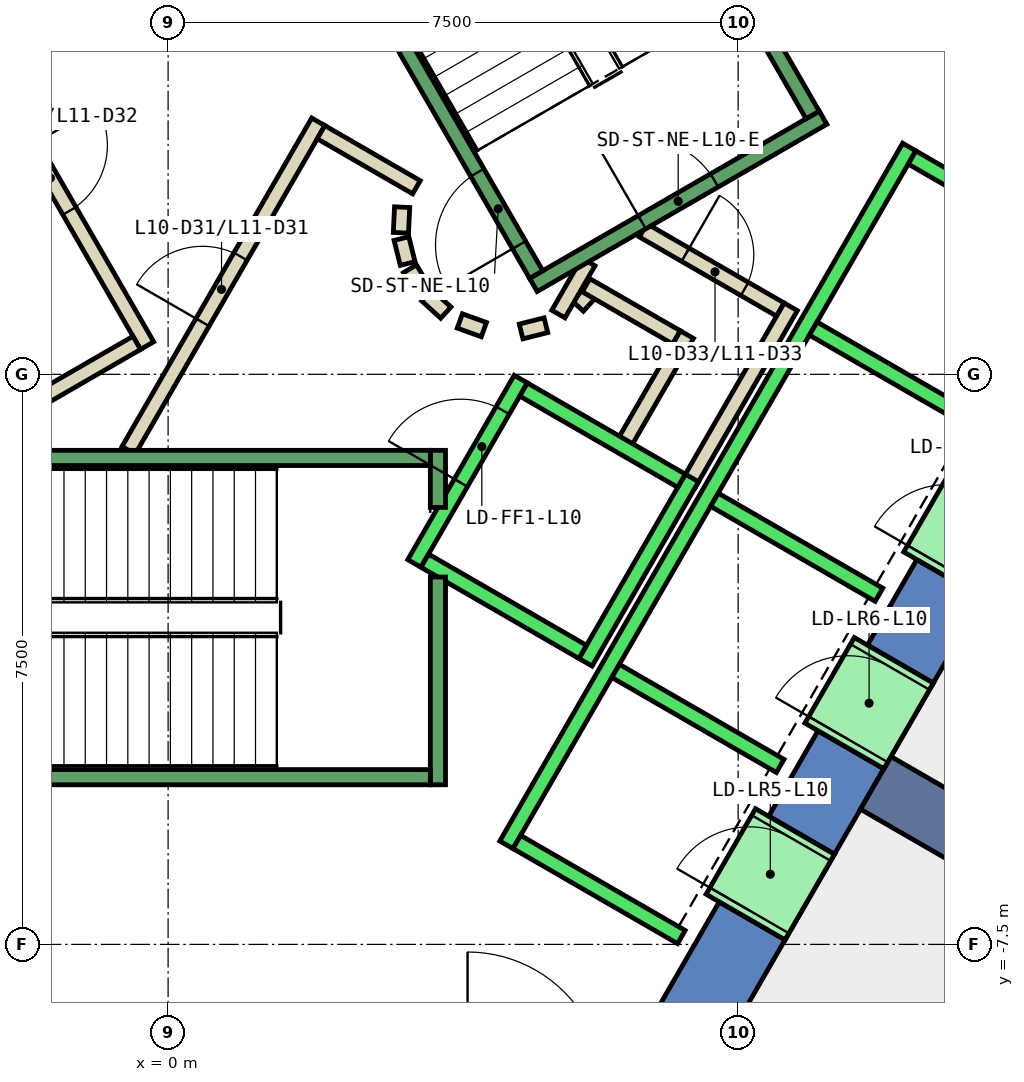
"""IFC4 building model, lengths in metres.
Left out: names, types, materials, properties, quantities, classifications, styles, units other than length and angle.
Written with IfcOpenShell. Run it as: python <this file> out.ifc"""

import sys

from ifc_helpers import new_model, si_unit, direction, frame, frame_2d, origin, place, context, subcontext, project, spatial, polyline, rectangle, outline, extrude, element, fill, save


model = new_model("IFC4")
c1 = context("Model", 3, precision=1e-05, world=origin(), true_north=direction((0.0, 1.0)))
c2 = subcontext(c1, "Body", "Model", "MODEL_VIEW")
j1 = project(units=[si_unit("LENGTHUNIT", "METRE"), si_unit("PLANEANGLEUNIT", "RADIAN")], contexts=[c1])
p1 = place(None, origin())
s1 = spatial("IfcSite", under=j1, at=p1, CompositionType="ELEMENT")
p2 = place(p1, origin())
s2 = spatial("IfcBuilding", under=s1, at=p2, CompositionType="ELEMENT")
p3 = place(p2, frame((0.0, 0.0, 51.8)))
s3 = spatial("IfcBuildingStorey", under=s2, at=p3, CompositionType="ELEMENT", Elevation=51.8)
p4 = place(p3, frame((0.0, 0.0, -0.4)))
e1 = element("IfcWall", 1, at=p4, inside=s3, PredefinedType="SHEAR", context=c2, shape_type="SweptSolid", body=[
    extrude(outline(polyline([(8.517, 11.748), (7.651, 11.248), (12.702, 2.5), (13.856, 2.5), (8.517, 11.748)])), origin(), (0.0, 0.0, 1.0), 4.2),
])
p5 = place(p3, frame((0.0, 0.0, -0.4)))
e2 = element("IfcWall", 2, at=p5, inside=s3, PredefinedType="SHEAR", context=c2, shape_type="SweptSolid", body=[
    extrude(outline(polyline([(8.117, -7.44), (7.252, -6.94), (6.351, -8.5), (6.928, -9.5), (8.117, -7.44)])), origin(), (0.0, 0.0, 1.0), 4.2),
])
p6 = place(p3, frame((0.0, 0.0, -0.4)))
e3 = element("IfcWall", 3, at=p6, inside=s3, PredefinedType="SHEAR", context=c2, shape_type="SweptSolid", body=[
    extrude(outline(polyline([(9.417, -5.189), (8.551, -4.689), (7.902, -5.814), (8.767, -6.314), (9.417, -5.189)])), origin(), (0.0, 0.0, 1.0), 4.2),
])
p7 = place(p3, frame((0.0, 0.0, -0.4)))
e4 = element("IfcWall", 4, at=p7, inside=s3, PredefinedType="SHEAR", context=c2, shape_type="SweptSolid", body=[
    extrude(outline(polyline([(10.717, -2.937), (9.851, -2.437), (9.201, -3.563), (10.067, -4.063), (10.717, -2.937)])), origin(), (0.0, 0.0, 1.0), 4.2),
])
p8 = place(p3, frame((0.0, 0.0, 3.6)))
e5 = element("IfcWall", 5, at=p8, inside=s3, PredefinedType="SHEAR", context=c2, shape_type="SweptSolid", body=[
    extrude(outline(polyline([(8.767, -6.314), (7.902, -5.814), (7.252, -6.94), (8.117, -7.44), (8.767, -6.314)])), origin(), (0.0, 0.0, 1.0), 0.2),
])
p9 = place(p3, frame((0.0, 0.0, 3.6)))
e6 = element("IfcWall", 6, at=p9, inside=s3, PredefinedType="SHEAR", context=c2, shape_type="SweptSolid", body=[
    extrude(outline(polyline([(10.067, -4.063), (9.201, -3.563), (8.551, -4.689), (9.417, -5.189), (10.067, -4.063)])), origin(), (0.0, 0.0, 1.0), 0.2),
])
p10 = place(p3, frame((0.0, 0.0, 3.6)))
e7 = element("IfcWall", 7, at=p10, inside=s3, PredefinedType="SHEAR", context=c2, shape_type="SweptSolid", body=[
    extrude(outline(polyline([(11.367, -1.811), (10.501, -1.311), (9.851, -2.437), (10.717, -2.937), (11.367, -1.811)])), origin(), (0.0, 0.0, 1.0), 0.2),
])
p11 = place(p3, frame((9.31, -5.375, -0.4), z_axis=(0.0, 0.0, 1.0), x_axis=(0.866017533419, -0.500013631625, 0.0)))
e8 = element("IfcWall", 8, at=p11, inside=s3, PredefinedType="SHEAR", context=c2, shape_type="SweptSolid", body=[
    extrude(rectangle(XDim=9.0, YDim=0.8, at=frame_2d((4.5, 0.0))), origin(), (0.0, 0.0, 1.0), 4.2),
])
p12 = place(p3, frame((5.39, 0.898, 0.0), z_axis=(0.0, 0.0, 1.0), x_axis=(0.673828488714, 0.738887791073, 0.0)))
e9 = element("IfcWall", 9, at=p12, inside=s3, PredefinedType="PARTITIONING", context=c2, shape_type="SweptSolid", body=[
    extrude(rectangle(XDim=0.263, YDim=0.2, at=frame_2d((0.131, 0.0))), origin(), (0.0, 0.0, 1.0), 3.8),
])
p13 = place(p3, frame((5.499, 1.172, 0.0), z_axis=(0.0, 0.0, 1.0), x_axis=(0.866333505267, -0.499465972466, 0.0)))
e10 = element("IfcWall", 10, at=p13, inside=s3, PredefinedType="PARTITIONING", context=c2, shape_type="SweptSolid", body=[
    extrude(rectangle(XDim=1.374, YDim=0.2, at=frame_2d((0.687, 0.0))), origin(), (0.0, 0.0, 1.0), 3.8),
])
p14 = place(p3, frame((6.826, 0.522, 0.0), z_axis=(0.0, 0.0, 1.0), x_axis=(-0.500016722714, -0.866015748706, 0.0)))
e11 = element("IfcWall", 11, at=p14, inside=s3, PredefinedType="PARTITIONING", context=c2, shape_type="SweptSolid", body=[
    extrude(rectangle(XDim=1.7, YDim=0.2, at=frame_2d((0.85, 0.0))), origin(), (0.0, 0.0, 1.0), 3.8),
])
p15 = place(p3, frame((6.25, 1.894, 0.0), z_axis=(0.0, 0.0, 1.0), x_axis=(0.866043184279, -0.499969202016, 0.0)))
e12 = element("IfcWall", 12, at=p15, inside=s3, PredefinedType="PARTITIONING", context=c2, shape_type="SweptSolid", body=[
    extrude(rectangle(XDim=2.084, YDim=0.2, at=frame_2d((1.042, 0.0))), origin(), (0.0, 0.0, 1.0), 3.8),
])
p16 = place(p15, frame((0.642, 0.0, 0.0)))
e13 = element("IfcOpeningElement", 13, at=p16, cuts=e12, PredefinedType="OPENING", context=c2, shape_type="SweptSolid", body=[
    extrude(rectangle(XDim=0.9, YDim=2.1, at=frame_2d((0.45, 1.05))), frame((0.0, 0.11, 0.0), z_axis=(0.0, -1.0, 0.0), x_axis=(1.0, 0.0, 0.0)), (0.0, 0.0, 1.0), 0.22),
])
p17 = place(p3, frame((8.192, 0.888, 0.0), z_axis=(0.0, 0.0, 1.0), x_axis=(-0.499940625693, -0.866059680843, 0.0)))
e14 = element("IfcWall", 14, at=p17, inside=s3, PredefinedType="PARTITIONING", context=c2, shape_type="SweptSolid", body=[
    extrude(rectangle(XDim=2.68, YDim=0.2, at=frame_2d((1.34, 0.0))), origin(), (0.0, 0.0, 1.0), 3.8),
])
p18 = place(p3, frame((5.135, 0.793, 0.0), z_axis=(0.0, 0.0, 1.0), x_axis=(0.499526442893, 0.866298639529, 0.0)))
e15 = element("IfcWall", 15, at=p18, inside=s3, PredefinedType="PARTITIONING", context=c2, shape_type="SweptSolid", body=[
    extrude(rectangle(XDim=0.791, YDim=0.2, at=frame_2d((0.396, 0.0))), origin(), (0.0, 0.0, 1.0), 3.8),
])
p19 = place(p3, frame((-0.52, -1.0, 0.0), z_axis=(0.0, 0.0, 1.0), x_axis=(0.50011622646, 0.865958290007, 0.0)))
e16 = element("IfcWall", 16, at=p19, inside=s3, PredefinedType="PARTITIONING", context=c2, shape_type="SweptSolid", body=[
    extrude(rectangle(XDim=4.991, YDim=0.2, at=frame_2d((2.496, 0.0))), origin(), (0.0, 0.0, 1.0), 3.8),
])
p20 = place(p19, frame((1.945, 0.0, 0.0)))
e17 = element("IfcOpeningElement", 17, at=p20, cuts=e16, PredefinedType="OPENING", context=c2, shape_type="SweptSolid", body=[
    extrude(rectangle(XDim=1.0, YDim=2.1, at=frame_2d((0.5, 1.05))), frame((0.0, 0.11, 0.0), z_axis=(0.0, -1.0, 0.0), x_axis=(1.0, 0.0, 0.0)), (0.0, 0.0, 1.0), 0.22),
])
p21 = place(p3, frame((2.012, 3.186, 0.0), z_axis=(0.0, 0.0, 1.0), x_axis=(0.865891012941, -0.500232699559, 0.0)))
e18 = element("IfcWall", 18, at=p21, inside=s3, PredefinedType="PARTITIONING", context=c2, shape_type="SweptSolid", body=[
    extrude(rectangle(XDim=1.449, YDim=0.2, at=frame_2d((0.725, 0.0))), origin(), (0.0, 0.0, 1.0), 3.8),
])
p22 = place(p3, frame((3.079, 2.199, 0.0), z_axis=(0.0, 0.0, 1.0), x_axis=(-0.047771483479, -0.998858290933, 0.0)))
e19 = element("IfcWall", 19, at=p22, inside=s3, PredefinedType="PARTITIONING", context=c2, shape_type="SweptSolid", body=[
    extrude(rectangle(XDim=0.337, YDim=0.2, at=frame_2d((0.169, 0.0))), origin(), (0.0, 0.0, 1.0), 3.8),
])
p23 = place(p3, frame((3.07, 1.786, 0.0), z_axis=(0.0, 0.0, 1.0), x_axis=(0.242705583207, -0.970099994784, 0.0)))
e20 = element("IfcWall", 20, at=p23, inside=s3, PredefinedType="PARTITIONING", context=c2, shape_type="SweptSolid", body=[
    extrude(rectangle(XDim=0.338, YDim=0.2, at=frame_2d((0.169, 0.0))), origin(), (0.0, 0.0, 1.0), 3.8),
])
for number, where, z_axis, x_axis in (
    (21, (3.182, 1.388, 0.0), (0.0, 0.0, 1.0), (0.512, -0.859, 0.0)),
    (22, (3.404, 1.039, 0.0), (0.0, 0.0, 1.0), (0.74, -0.672, 0.0)),
):
    element("IfcWall", number, at=place(p3, frame(where, z_axis=z_axis, x_axis=x_axis)), inside=s3, PredefinedType="PARTITIONING", context=c2, shape_type="SweptSolid", body=[
        extrude(rectangle(XDim=0.338, YDim=0.2, at=frame_2d((0.169, 0.0))), origin(), (0.0, 0.0, 1.0), 3.8),
    ])
p24 = place(p3, frame((3.838, 0.702, 0.0), z_axis=(0.0, 0.0, 1.0), x_axis=(0.941035081519, -0.338308993895, 0.0)))
e23 = element("IfcWall", 23, at=p24, inside=s3, PredefinedType="PARTITIONING", context=c2, shape_type="SweptSolid", body=[
    extrude(rectangle(XDim=0.337, YDim=0.2, at=frame_2d((0.168, 0.0))), origin(), (0.0, 0.0, 1.0), 3.8),
])
p25 = place(p3, frame((4.644, 0.564, 0.0), z_axis=(0.0, 0.0, 1.0), x_axis=(0.969929076366, 0.243387729394, 0.0)))
e24 = element("IfcWall", 24, at=p25, inside=s3, PredefinedType="PARTITIONING", context=c2, shape_type="SweptSolid", body=[
    extrude(rectangle(XDim=0.337, YDim=0.2, at=frame_2d((0.168, 0.0))), origin(), (0.0, 0.0, 1.0), 3.8),
])
p26 = place(p3, frame((-2.771, 4.7, 0.0), z_axis=(0.0, 0.0, 1.0), x_axis=(0.499969479948, -0.866043023828, 0.0)))
e25 = element("IfcWall", 25, at=p26, inside=s3, PredefinedType="PARTITIONING", context=c2, shape_type="SweptSolid", body=[
    extrude(rectangle(XDim=4.99, YDim=0.2, at=frame_2d((2.495, 0.0))), origin(), (0.0, 0.0, 1.0), 3.8),
])
p27 = place(p26, frame((1.945, 0.0, 0.0)))
e26 = element("IfcOpeningElement", 26, at=p27, cuts=e25, PredefinedType="OPENING", context=c2, shape_type="SweptSolid", body=[
    extrude(rectangle(XDim=1.0, YDim=2.1, at=frame_2d((0.5, 1.05))), frame((0.0, 0.11, 0.0), z_axis=(0.0, -1.0, 0.0), x_axis=(1.0, 0.0, 0.0)), (0.0, 0.0, 1.0), 0.22),
])
p28 = place(p3, frame((-0.412, 0.414, 0.0), z_axis=(0.0, 0.0, 1.0), x_axis=(-0.866017369001, -0.500013916395, 0.0)))
e27 = element("IfcWall", 27, at=p28, inside=s3, PredefinedType="PARTITIONING", context=c2, shape_type="SweptSolid", body=[
    extrude(rectangle(XDim=1.45, YDim=0.2, at=frame_2d((0.725, 0.0))), origin(), (0.0, 0.0, 1.0), 3.8),
])
p29 = place(p3, frame((12.401, -7.621, 0.0), z_axis=(0.0, 0.0, 1.0), x_axis=(-0.499983724212, -0.866034800411, 0.0)))
e28 = element("IfcWall", 28, at=p29, inside=s3, PredefinedType="PARTITIONING", context=c2, shape_type="SweptSolid", body=[
    extrude(rectangle(XDim=9.302, YDim=0.2, at=frame_2d((4.651, 0.0))), origin(), (0.0, 0.0, 1.0), 3.8),
])
p30 = place(p3, frame((3.24, -2.488, 0.0), z_axis=(0.0, 0.0, 1.0), x_axis=(0.49994636267, 0.866056369097, 0.0)))
e29 = element("IfcWall", 29, at=p30, inside=s3, PredefinedType="STANDARD", context=c2, shape_type="SweptSolid", body=[
    extrude(rectangle(XDim=2.8, YDim=0.2, at=frame_2d((1.4, 0.0))), origin(), (0.0, 0.0, 1.0), 3.8),
])
p31 = place(p30, frame((1.225, 0.0, 0.0)))
e30 = element("IfcOpeningElement", 30, at=p31, cuts=e29, PredefinedType="OPENING", context=c2, shape_type="SweptSolid", body=[
    extrude(rectangle(XDim=1.1, YDim=2.1, at=frame_2d((0.55, 1.05))), frame((0.0, 0.11, 0.0), z_axis=(0.0, -1.0, 0.0), x_axis=(1.0, 0.0, 0.0)), (0.0, 0.0, 1.0), 0.22),
])
p32 = place(p3, frame((5.492, -3.788, 0.0), z_axis=(0.0, 0.0, 1.0), x_axis=(0.500011755427, 0.866018616679, 0.0)))
e31 = element("IfcWall", 31, at=p32, inside=s3, PredefinedType="STANDARD", context=c2, shape_type="SweptSolid", body=[
    extrude(rectangle(XDim=2.8, YDim=0.2, at=frame_2d((1.4, 0.0))), origin(), (0.0, 0.0, 1.0), 3.8),
])
p33 = place(p3, frame((3.377, -2.452, 0.0), z_axis=(0.0, 0.0, 1.0), x_axis=(0.865955154139, -0.50012165622, 0.0)))
e32 = element("IfcWall", 32, at=p33, inside=s3, PredefinedType="STANDARD", context=c2, shape_type="SweptSolid", body=[
    extrude(rectangle(XDim=2.4, YDim=0.2, at=frame_2d((1.2, 0.0))), origin(), (0.0, 0.0, 1.0), 3.8),
])
p34 = place(p3, frame((4.677, -0.2, 0.0), z_axis=(0.0, 0.0, 1.0), x_axis=(0.865973769406, -0.500089422704, 0.0)))
e33 = element("IfcWall", 33, at=p34, inside=s3, PredefinedType="STANDARD", context=c2, shape_type="SweptSolid", body=[
    extrude(rectangle(XDim=2.399, YDim=0.2, at=frame_2d((1.2, 0.0))), origin(), (0.0, 0.0, 1.0), 3.8),
])
p35 = place(p3, frame((4.451, -6.19, 0.0), z_axis=(0.0, 0.0, 1.0), x_axis=(0.50000090737, 0.866024879913, 0.0)))
e34 = element("IfcWall", 34, at=p35, inside=s3, PredefinedType="STANDARD", context=c2, shape_type="SweptSolid", body=[
    extrude(rectangle(XDim=10.6, YDim=0.2, at=frame_2d((5.3, 0.0))), origin(), (0.0, 0.0, 1.0), 3.8),
])
for number, where, z_axis, x_axis in (
    (35, (4.588, -6.153, 0.0), (0.0, 0.0, 1.0), (0.866, -0.5, 0.0)),
    (36, (5.888, -3.902, 0.0), (0.0, 0.0, 1.0), (0.866, -0.5, 0.0)),
    (37, (7.188, -1.65, 0.0), (0.0, 0.0, 1.0), (0.866, -0.5, 0.0)),
    (38, (8.488, 0.602, 0.0), (0.0, 0.0, 1.0), (0.866, -0.5, 0.0)),
):
    element("IfcWall", number, at=place(p3, frame(where, z_axis=z_axis, x_axis=x_axis)), inside=s3, PredefinedType="STANDARD", context=c2, shape_type="SweptSolid", body=[
        extrude(rectangle(XDim=2.5, YDim=0.2, at=frame_2d((1.25, 0.0))), origin(), (0.0, 0.0, 1.0), 3.8),
    ])
p36 = place(p3, frame((9.788, 2.853, 0.0), z_axis=(0.0, 0.0, 1.0), x_axis=(0.865998541277, -0.500046524342, 0.0)))
e39 = element("IfcWall", 39, at=p36, inside=s3, PredefinedType="STANDARD", context=c2, shape_type="SweptSolid", body=[
    extrude(rectangle(XDim=2.5, YDim=0.2, at=frame_2d((1.25, 0.0))), origin(), (0.0, 0.0, 1.0), 3.8),
])
p37 = place(p3, frame((7.598, -7.14, 0.0), z_axis=(0.0, 0.0, 1.0), x_axis=(0.500362116554, 0.865816234728, 0.0)))
e40 = element("IfcWall", 40, at=p37, inside=s3, PredefinedType="STANDARD", context=c2, shape_type="SweptSolid", body=[
    extrude(rectangle(XDim=1.299, YDim=1.2, at=frame_2d((0.65, 0.0))), origin(), (0.0, 0.0, 1.0), 2.4),
])
p38 = place(p37, frame((0.1, 0.0, 0.0)))
e41 = element("IfcOpeningElement", 41, at=p38, cuts=e40, PredefinedType="OPENING", context=c2, shape_type="SweptSolid", body=[
    extrude(rectangle(XDim=1.1, YDim=2.3, at=frame_2d((0.55, 1.15))), frame((0.0, 0.61, 0.0), z_axis=(0.0, -1.0, 0.0), x_axis=(1.0, 0.0, 0.0)), (0.0, 0.0, 1.0), 1.22),
])
p39 = place(p3, frame((8.898, -4.889, 0.0), z_axis=(0.0, 0.0, 1.0), x_axis=(0.500036693733, 0.866004217611, 0.0)))
e42 = element("IfcWall", 42, at=p39, inside=s3, PredefinedType="STANDARD", context=c2, shape_type="SweptSolid", body=[
    extrude(rectangle(XDim=1.3, YDim=1.2, at=frame_2d((0.65, 0.0))), origin(), (0.0, 0.0, 1.0), 2.4),
])
p40 = place(p39, frame((0.1, 0.0, 0.0)))
e43 = element("IfcOpeningElement", 43, at=p40, cuts=e42, PredefinedType="OPENING", context=c2, shape_type="SweptSolid", body=[
    extrude(rectangle(XDim=1.1, YDim=2.3, at=frame_2d((0.55, 1.15))), frame((0.0, 0.61, 0.0), z_axis=(0.0, -1.0, 0.0), x_axis=(1.0, 0.0, 0.0)), (0.0, 0.0, 1.0), 1.22),
])
p41 = place(p3, frame((10.198, -2.637, 0.0), z_axis=(0.0, 0.0, 1.0), x_axis=(0.49989585183, 0.866085525409, 0.0)))
e44 = element("IfcWall", 44, at=p41, inside=s3, PredefinedType="STANDARD", context=c2, shape_type="SweptSolid", body=[
    extrude(rectangle(XDim=1.3, YDim=1.2, at=frame_2d((0.65, 0.0))), origin(), (0.0, 0.0, 1.0), 2.4),
])
p42 = place(p41, frame((0.1, 0.0, 0.0)))
e45 = element("IfcOpeningElement", 45, at=p42, cuts=e44, PredefinedType="OPENING", context=c2, shape_type="SweptSolid", body=[
    extrude(rectangle(XDim=1.1, YDim=2.3, at=frame_2d((0.55, 1.15))), frame((0.0, 0.61, 0.0), z_axis=(0.0, -1.0, 0.0), x_axis=(1.0, 0.0, 0.0)), (0.0, 0.0, 1.0), 1.22),
])
p43 = place(p3, frame((3.55, -2.667, 0.0), z_axis=(0.0, 0.0, 1.0), x_axis=(0.0, -1.0, 0.0)))
e46 = element("IfcWall", 46, at=p43, inside=s3, PredefinedType="STANDARD", context=c2, shape_type="SweptSolid", body=[
    extrude(rectangle(XDim=2.733, YDim=0.2, at=frame_2d((1.366, 0.0))), origin(), (0.0, 0.0, 1.0), 3.8),
])
p44 = place(p3, frame((3.55, -1.0, 0.0), z_axis=(0.0, 0.0, 1.0), x_axis=(0.0, -1.0, 0.0)))
e47 = element("IfcWall", 47, at=p44, inside=s3, PredefinedType="STANDARD", context=c2, shape_type="SweptSolid", body=[
    extrude(rectangle(XDim=0.751, YDim=0.2, at=frame_2d((0.375, 0.0))), origin(), (0.0, 0.0, 1.0), 3.8),
])
p45 = place(p3, frame((-3.45, -1.1, 0.0), z_axis=(0.0, 0.0, 1.0), x_axis=(1.0, 0.0, 0.0)))
e48 = element("IfcWall", 48, at=p45, inside=s3, PredefinedType="STANDARD", context=c2, shape_type="SweptSolid", body=[
    extrude(rectangle(XDim=6.9, YDim=0.2, at=frame_2d((3.45, 0.0))), origin(), (0.0, 0.0, 1.0), 3.8),
])
p46 = place(p45, frame((0.45, 0.0, 0.0)))
e49 = element("IfcOpeningElement", 49, at=p46, cuts=e48, PredefinedType="OPENING", context=c2, shape_type="SweptSolid", body=[
    extrude(rectangle(XDim=1.1, YDim=2.2, at=frame_2d((0.55, 1.1))), frame((0.0, 0.11, 0.0), z_axis=(0.0, -1.0, 0.0), x_axis=(1.0, 0.0, 0.0)), (0.0, 0.0, 1.0), 0.22),
])
p47 = place(p3, frame((-3.45, -5.3, 0.0), z_axis=(0.0, 0.0, 1.0), x_axis=(1.0, 0.0, 0.0)))
e50 = element("IfcWall", 50, at=p47, inside=s3, PredefinedType="STANDARD", context=c2, shape_type="SweptSolid", body=[
    extrude(rectangle(XDim=6.9, YDim=0.2, at=frame_2d((3.45, 0.0))), origin(), (0.0, 0.0, 1.0), 3.8),
])
p48 = place(p3, frame((4.806, 1.176, 0.0), z_axis=(0.0, 0.0, 1.0), x_axis=(0.866059941101, 0.499940174841, 0.0)))
e51 = element("IfcWall", 51, at=p48, inside=s3, PredefinedType="STANDARD", context=c2, shape_type="SweptSolid", body=[
    extrude(rectangle(XDim=4.4, YDim=0.2, at=frame_2d((2.2, 0.0))), origin(), (0.0, 0.0, 1.0), 3.8),
])
p49 = place(p48, frame((1.65, 0.0, 0.0)))
e52 = element("IfcOpeningElement", 52, at=p49, cuts=e51, PredefinedType="OPENING", context=c2, shape_type="SweptSolid", body=[
    extrude(rectangle(XDim=1.1, YDim=2.2, at=frame_2d((0.55, 1.1))), frame((0.0, 0.11, 0.0), z_axis=(0.0, -1.0, 0.0), x_axis=(1.0, 0.0, 0.0)), (0.0, 0.0, 1.0), 0.22),
])
p50 = place(p3, frame((4.843, 1.312, 0.0), z_axis=(0.0, 0.0, 1.0), x_axis=(-0.499963383562, 0.866046543262, 0.0)))
e53 = element("IfcWall", 53, at=p50, inside=s3, PredefinedType="STANDARD", context=c2, shape_type="SweptSolid", body=[
    extrude(rectangle(XDim=6.9, YDim=0.2, at=frame_2d((3.45, 0.0))), origin(), (0.0, 0.0, 1.0), 3.8),
])
p51 = place(p50, frame((0.45, 0.0, 0.0)))
e54 = element("IfcOpeningElement", 54, at=p51, cuts=e53, PredefinedType="OPENING", context=c2, shape_type="SweptSolid", body=[
    extrude(rectangle(XDim=1.1, YDim=2.2, at=frame_2d((0.55, 1.1))), frame((0.0, 0.11, 0.0), z_axis=(0.0, -1.0, 0.0), x_axis=(1.0, 0.0, 0.0)), (0.0, 0.0, 1.0), 0.22),
])
p52 = place(p3, frame((8.48, 3.412, 0.0), z_axis=(0.0, 0.0, 1.0), x_axis=(-0.499978703459, 0.866037698999, 0.0)))
e55 = element("IfcWall", 55, at=p52, inside=s3, PredefinedType="STANDARD", context=c2, shape_type="SweptSolid", body=[
    extrude(rectangle(XDim=6.9, YDim=0.2, at=frame_2d((3.45, 0.0))), origin(), (0.0, 0.0, 1.0), 3.8),
])
p53 = place(p3, frame((-1.393, 7.288, 0.0), z_axis=(0.0, 0.0, 1.0), x_axis=(-0.499963383562, -0.866046543262, 0.0)))
e56 = element("IfcWall", 56, at=p53, inside=s3, PredefinedType="STANDARD", context=c2, shape_type="SweptSolid", body=[
    extrude(rectangle(XDim=6.9, YDim=0.2, at=frame_2d((3.45, 0.0))), origin(), (0.0, 0.0, 1.0), 3.8),
])
p54 = place(p53, frame((0.45, 0.0, 0.0)))
e57 = element("IfcOpeningElement", 57, at=p54, cuts=e56, PredefinedType="OPENING", context=c2, shape_type="SweptSolid", body=[
    extrude(rectangle(XDim=1.1, YDim=2.2, at=frame_2d((0.55, 1.1))), frame((0.0, 0.11, 0.0), z_axis=(0.0, -1.0, 0.0), x_axis=(1.0, 0.0, 0.0)), (0.0, 0.0, 1.0), 0.22),
])
p55 = place(p20, origin())
e58 = element("IfcDoor", 58, at=p55, inside=s3, OperationType="SINGLE_SWING_LEFT", PredefinedType="DOOR", context=c2, shape_type="SweptSolid", body=[
    extrude(rectangle(XDim=1.0, YDim=2.1, at=frame_2d((0.5, 1.05))), frame((0.0, 0.025, 0.0), z_axis=(0.0, -1.0, 0.0), x_axis=(1.0, 0.0, 0.0)), (0.0, 0.0, 1.0), 0.05),
])
fill(e17, e58)
p56 = place(p27, origin())
e59 = element("IfcDoor", 59, at=p56, inside=s3, OperationType="SINGLE_SWING_RIGHT", PredefinedType="DOOR", context=c2, shape_type="SweptSolid", body=[
    extrude(rectangle(XDim=1.0, YDim=2.1, at=frame_2d((0.5, 1.05))), frame((0.0, 0.025, 0.0), z_axis=(0.0, -1.0, 0.0), x_axis=(1.0, 0.0, 0.0)), (0.0, 0.0, 1.0), 0.05),
])
fill(e26, e59)
p57 = place(p16, origin())
e60 = element("IfcDoor", 60, at=p57, inside=s3, OperationType="SINGLE_SWING_LEFT", PredefinedType="DOOR", context=c2, shape_type="SweptSolid", body=[
    extrude(rectangle(XDim=0.9, YDim=2.1, at=frame_2d((0.45, 1.05))), frame((0.0, 0.025, 0.0), z_axis=(0.0, -1.0, 0.0), x_axis=(1.0, 0.0, 0.0)), (0.0, 0.0, 1.0), 0.05),
])
fill(e13, e60)
p58 = place(p38, origin())
e61 = element("IfcDoor", 61, at=p58, inside=s3, OperationType="SLIDING_TO_LEFT", PredefinedType="DOOR", context=c2, shape_type="SweptSolid", body=[
    extrude(rectangle(XDim=1.1, YDim=2.3, at=frame_2d((0.55, 1.15))), frame((0.0, 0.025, 0.0), z_axis=(0.0, -1.0, 0.0), x_axis=(1.0, 0.0, 0.0)), (0.0, 0.0, 1.0), 0.05),
])
fill(e41, e61)
p59 = place(p40, origin())
e62 = element("IfcDoor", 62, at=p59, inside=s3, OperationType="SLIDING_TO_LEFT", PredefinedType="DOOR", context=c2, shape_type="SweptSolid", body=[
    extrude(rectangle(XDim=1.1, YDim=2.3, at=frame_2d((0.55, 1.15))), frame((0.0, 0.025, 0.0), z_axis=(0.0, -1.0, 0.0), x_axis=(1.0, 0.0, 0.0)), (0.0, 0.0, 1.0), 0.05),
])
fill(e43, e62)
p60 = place(p31, origin())
e63 = element("IfcDoor", 63, at=p60, inside=s3, OperationType="SLIDING_TO_LEFT", PredefinedType="DOOR", context=c2, shape_type="SweptSolid", body=[
    extrude(rectangle(XDim=1.1, YDim=2.1, at=frame_2d((0.55, 1.05))), frame((0.0, 0.025, 0.0), z_axis=(0.0, -1.0, 0.0), x_axis=(1.0, 0.0, 0.0)), (0.0, 0.0, 1.0), 0.05),
])
fill(e30, e63)
p61 = place(p51, origin())
e64 = element("IfcDoor", 64, at=p61, inside=s3, OperationType="SINGLE_SWING_LEFT", PredefinedType="DOOR", context=c2, shape_type="SweptSolid", body=[
    extrude(rectangle(XDim=1.1, YDim=2.2, at=frame_2d((0.55, 1.1))), frame((0.0, 0.025, 0.0), z_axis=(0.0, -1.0, 0.0), x_axis=(1.0, 0.0, 0.0)), (0.0, 0.0, 1.0), 0.05),
])
fill(e54, e64)
p62 = place(p49, origin())
e65 = element("IfcDoor", 65, at=p62, inside=s3, OperationType="SINGLE_SWING_LEFT", PredefinedType="DOOR", context=c2, shape_type="SweptSolid", body=[
    extrude(rectangle(XDim=1.1, YDim=2.2, at=frame_2d((0.55, 1.1))), frame((0.0, 0.025, 0.0), z_axis=(0.0, -1.0, 0.0), x_axis=(1.0, 0.0, 0.0)), (0.0, 0.0, 1.0), 0.05),
])
fill(e52, e65)
save(model, sys.argv[1])
